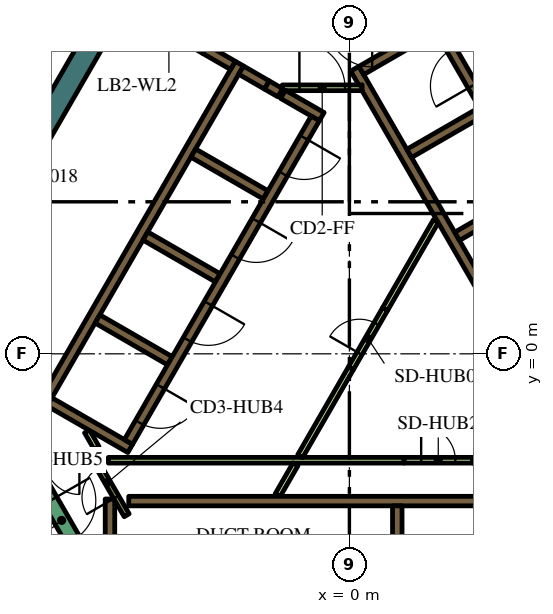
"""IFC4 building model, lengths in metres.
Left out: names, types, materials, properties, quantities, classifications, styles, units other than length and angle.
Written with IfcOpenShell. Run it as: python <this file> out.ifc"""

import sys

from ifc_helpers import new_model, si_unit, direction, frame, frame_2d, origin, place, context, subcontext, project, spatial, polyline, rectangle, outline, extrude, element, fill, save


model = new_model("IFC4")
c1 = context("Model", 3, precision=1e-05, world=origin(), true_north=direction((0.0, 1.0)))
c2 = subcontext(c1, "Body", "Model", "MODEL_VIEW")
j1 = project(units=[si_unit("LENGTHUNIT", "METRE"), si_unit("PLANEANGLEUNIT", "RADIAN")], contexts=[c1])
p1 = place(None, origin())
s1 = spatial("IfcSite", under=j1, at=p1, CompositionType="ELEMENT")
p2 = place(p1, origin())
s2 = spatial("IfcBuilding", under=s1, at=p2, CompositionType="ELEMENT")
p3 = place(p2, frame((0.0, 0.0, 288.0)))
s3 = spatial("IfcBuildingStorey", under=s2, at=p3, CompositionType="ELEMENT", Elevation=288.0)
p4 = place(p3, frame((1.989, 16.456, 0.0), z_axis=(0.0, 0.0, 1.0), x_axis=(0.49999102663, -0.8660305845, 0.0)))
e1 = element("IfcWall", 1, at=p4, inside=s3, PredefinedType="SOLIDWALL", context=c2, shape_type="SweptSolid", body=[
    extrude(rectangle(XDim=12.406, YDim=0.6, at=frame_2d((6.203, 0.0))), origin(), (0.0, 0.0, 1.0), 4.2),
])
p5 = place(p3, origin())
e2 = element("IfcWall", 2, at=p5, inside=s3, PredefinedType="SOLIDWALL", context=c2, shape_type="SweptSolid", body=[
    extrude(outline(polyline([(-15.502, -6.35), (-4.912, 11.992), (-4.393, 11.692), (-10.815, 0.569), (-10.84, 0.583), (-10.84, 0.583), (-10.84, 0.583), (-10.965, 0.367), (-10.965, 0.367), (-10.965, 0.367), (-10.94, 0.352), (-11.033, 0.191), (-14.809, -6.35), (-15.156, -6.95), (-15.502, -6.35)])), origin(), (0.0, 0.0, 1.0), 4.2),
])
p6 = place(p3, frame((-5.806, -3.875, 0.0), z_axis=(0.0, 0.0, 1.0), x_axis=(1.0, 0.0, 0.0)))
e3 = element("IfcWall", 3, at=p6, inside=s3, PredefinedType="SOLIDWALL", context=c2, shape_type="SweptSolid", body=[
    extrude(rectangle(XDim=12.231, YDim=0.25, at=frame_2d((6.116, 0.0))), origin(), (0.0, 0.0, 1.0), 4.2),
])
p7 = place(p3, frame((1.26, -4.0, 0.0), z_axis=(0.0, 0.0, 1.0), x_axis=(0.0, -1.0, 0.0)))
e4 = element("IfcWall", 4, at=p7, inside=s3, PredefinedType="SOLIDWALL", context=c2, shape_type="SweptSolid", body=[
    extrude(rectangle(XDim=2.2, YDim=0.25, at=frame_2d((1.1, 0.0))), origin(), (0.0, 0.0, 1.0), 4.2),
])
p8 = place(p3, frame((-6.3, -9.05, 0.0), z_axis=(0.0, 0.0, 1.0), x_axis=(0.0, 1.0, 0.0)))
e5 = element("IfcWall", 5, at=p8, inside=s3, PredefinedType="SOLIDWALL", context=c2, shape_type="SweptSolid", body=[
    extrude(rectangle(XDim=5.23, YDim=0.25, at=frame_2d((2.615, 0.0))), origin(), (0.0, 0.0, 1.0), 4.2),
])
e6 = element("IfcWall", 6, at=p5, inside=s3, PredefinedType="SOLIDWALL", context=c2, shape_type="SweptSolid", body=[
    extrude(outline(polyline([(0.332, 6.925), (0.335, 6.925), (0.335, 6.925), (0.335, 6.925), (0.335, 7.075), (0.335, 7.075), (0.335, 7.075), (0.245, 7.075), (0.035, 7.439), (0.252, 7.564), (0.377, 7.348), (1.512, 5.382), (1.637, 5.165), (2.221, 4.153), (2.771, 3.199), (2.896, 2.983), (3.138, 2.564), (4.031, 1.017), (4.156, 0.801), (5.292, -1.165), (5.417, -1.382), (6.073, -2.519), (6.552, -3.348), (6.677, -3.564), (6.46, -3.689), (0.332, 6.925)])), origin(), (0.0, 0.0, 1.0), 4.2),
])
p9 = place(p3, frame((3.1, 9.064, 0.0), z_axis=(0.0, 0.0, 1.0), x_axis=(-0.866030133475, -0.499991807846, 0.0)))
e7 = element("IfcWall", 7, at=p9, inside=s3, PredefinedType="SOLIDWALL", context=c2, shape_type="SweptSolid", body=[
    extrude(rectangle(XDim=3.217, YDim=0.25, at=frame_2d((1.608, 0.0))), origin(), (0.0, 0.0, 1.0), 4.2),
])
p10 = place(p3, frame((1.574, 5.274, 0.0), z_axis=(0.0, 0.0, 1.0), x_axis=(0.866028486751, 0.499994660107, 0.0)))
e8 = element("IfcWall", 8, at=p10, inside=s3, PredefinedType="SOLIDWALL", context=c2, shape_type="SweptSolid", body=[
    extrude(rectangle(XDim=2.2, YDim=0.25, at=frame_2d((1.1, 0.0))), origin(), (0.0, 0.0, 1.0), 4.2),
])
p11 = place(p3, frame((2.834, 3.091, 0.0), z_axis=(0.0, 0.0, 1.0), x_axis=(0.866008176907, 0.50002983664, 0.0)))
e9 = element("IfcWall", 9, at=p11, inside=s3, PredefinedType="SOLIDWALL", context=c2, shape_type="SweptSolid", body=[
    extrude(rectangle(XDim=2.2, YDim=0.25, at=frame_2d((1.1, 0.0))), origin(), (0.0, 0.0, 1.0), 4.2),
])
p12 = place(p3, frame((-8.06, -1.311, 0.0), z_axis=(0.0, 0.0, 1.0), x_axis=(0.50000273126, 0.866023826885, 0.0)))
e10 = element("IfcWall", 10, at=p12, inside=s3, PredefinedType="SOLIDWALL", context=c2, shape_type="SweptSolid", body=[
    extrude(rectangle(XDim=10.33, YDim=0.25, at=frame_2d((5.165, 0.0))), origin(), (0.0, 0.0, 1.0), 4.2),
])
p13 = place(p3, frame((-1.819, 6.87, 0.0), z_axis=(0.0, 0.0, 1.0), x_axis=(-0.866294599386, 0.499533449405, 0.0)))
e11 = element("IfcWall", 11, at=p13, inside=s3, PredefinedType="SOLIDWALL", context=c2, shape_type="SweptSolid", body=[
    extrude(rectangle(XDim=0.41, YDim=0.25, at=frame_2d((0.205, 0.0))), origin(), (0.0, 0.0, 1.0), 4.2),
])
p14 = place(p3, frame((-2.849, 7.465, 0.0), z_axis=(0.0, 0.0, 1.0), x_axis=(0.865955664968, -0.500120771724, 0.0)))
e12 = element("IfcWall", 12, at=p14, inside=s3, PredefinedType="SOLIDWALL", context=c2, shape_type="SweptSolid", body=[
    extrude(rectangle(XDim=0.778, YDim=0.25, at=frame_2d((0.389, 0.0))), origin(), (0.0, 0.0, 1.0), 4.2),
])
p15 = place(p3, frame((-0.728, 6.24, 0.0), z_axis=(0.0, 0.0, 1.0), x_axis=(-0.866002680491, 0.500039355833, 0.0)))
e13 = element("IfcWall", 13, at=p15, inside=s3, PredefinedType="SOLIDWALL", context=c2, shape_type="SweptSolid", body=[
    extrude(rectangle(XDim=1.178, YDim=0.25, at=frame_2d((0.589, 0.0))), origin(), (0.0, 0.0, 1.0), 4.2),
])
for number, where, z_axis, x_axis in (
    (14, (-2.204, 4.182, 0.0), (0.0, 0.0, 1.0), (-0.866, 0.5, 0.0)),
    (15, (-5.369, 3.1, 0.0), (0.0, 0.0, 1.0), (0.866, -0.5, 0.0)),
    (16, (-4.724, -0.182, 0.0), (0.0, 0.0, 1.0), (-0.866, 0.5, 0.0)),
):
    element("IfcWall", number, at=place(p3, frame(where, z_axis=z_axis, x_axis=x_axis)), inside=s3, PredefinedType="SOLIDWALL", context=c2, shape_type="SweptSolid", body=[
        extrude(rectangle(XDim=2.2, YDim=0.25, at=frame_2d((1.1, 0.0))), origin(), (0.0, 0.0, 1.0), 4.2),
    ])
p16 = place(p3, frame((-7.889, -1.265, 0.0), z_axis=(0.0, 0.0, 1.0), x_axis=(0.866057815567, -0.499943856944, 0.0)))
e17 = element("IfcWall", 17, at=p16, inside=s3, PredefinedType="SOLIDWALL", context=c2, shape_type="SweptSolid", body=[
    extrude(rectangle(XDim=2.45, YDim=0.25, at=frame_2d((1.225, 0.0))), origin(), (0.0, 0.0, 1.0), 4.2),
])
p17 = place(p3, frame((-3.809, 8.019, 0.0), z_axis=(0.0, 0.0, 1.0), x_axis=(0.866010229787, -0.500026281214, 0.0)))
e18 = element("IfcWall", 18, at=p17, inside=s3, PredefinedType="SOLIDWALL", context=c2, shape_type="SweptSolid", body=[
    extrude(rectangle(XDim=0.858, YDim=0.25, at=frame_2d((0.429, 0.0))), origin(), (0.0, 0.0, 1.0), 4.2),
])
p18 = place(p3, frame((0.941, 1.179, 0.0), z_axis=(0.0, 0.0, 1.0), x_axis=(0.499962406319, 0.866047107418, 0.0)))
e19 = element("IfcWall", 19, at=p18, inside=s3, PredefinedType="PARTITIONING", context=c2, shape_type="SweptSolid", body=[
    extrude(rectangle(XDim=2.672, YDim=0.15, at=frame_2d((1.336, 0.0))), origin(), (0.0, 0.0, 1.0), 3.55),
])
p19 = place(p3, frame((1.438, -2.8, 0.0), z_axis=(0.0, 0.0, 1.0), x_axis=(-1.0, 0.0, 0.0)))
e20 = element("IfcWall", 20, at=p19, inside=s3, PredefinedType="PARTITIONING", context=c2, shape_type="SweptSolid", body=[
    extrude(rectangle(XDim=7.781, YDim=0.15, at=frame_2d((3.891, 0.0))), origin(), (0.0, 0.0, 1.0), 3.55),
])
p20 = place(p3, frame((-1.418, -2.907, 0.0), z_axis=(0.0, 0.0, 1.0), x_axis=(-0.499978056798, -0.866038072327, 0.0)))
e21 = element("IfcWall", 21, at=p20, inside=s3, PredefinedType="PARTITIONING", context=c2, shape_type="SweptSolid", body=[
    extrude(rectangle(XDim=0.937, YDim=0.15, at=frame_2d((0.469, 0.0))), origin(), (0.0, 0.0, 1.0), 3.55),
])
for number, where, z_axis, x_axis in (
    (22, (-1.295, -2.693, 0.0), (0.0, 0.0, 1.0), (0.5, 0.866, 0.0)),
    (23, (3.238, -2.8, 0.0), (0.0, 0.0, 1.0), (1.0, 0.0, 0.0)),
):
    element("IfcWall", number, at=place(p3, frame(where, z_axis=z_axis, x_axis=x_axis)), inside=s3, PredefinedType="PARTITIONING", context=c2, shape_type="SweptSolid", body=[
        extrude(rectangle(XDim=2.672, YDim=0.15, at=frame_2d((1.336, 0.0))), origin(), (0.0, 0.0, 1.0), 3.55),
    ])
p21 = place(p3, frame((-6.653, -2.477, 0.0), z_axis=(0.0, 0.0, 1.0), x_axis=(-0.500002592159, 0.866023907196, 0.0)))
e24 = element("IfcWall", 24, at=p21, inside=s3, PredefinedType="PARTITIONING", context=c2, shape_type="SweptSolid", body=[
    extrude(rectangle(XDim=0.503, YDim=0.15, at=frame_2d((0.251, 0.0))), origin(), (0.0, 0.0, 1.0), 3.55),
])
p22 = place(p3, frame((8.565, -2.185, 0.0), z_axis=(0.0, 0.0, 1.0), x_axis=(-0.499997954832, 0.866026584559, 0.0)))
e25 = element("IfcWall", 25, at=p22, inside=s3, PredefinedType="SOLIDWALL", context=c2, shape_type="SweptSolid", body=[
    extrude(rectangle(XDim=12.35, YDim=0.25, at=frame_2d((6.175, 0.0))), origin(), (0.0, 0.0, 1.0), 4.2),
])
p23 = place(p22, frame((0.685, 0.0, 0.0)))
e26 = element("IfcOpeningElement", 26, at=p23, cuts=e25, PredefinedType="OPENING", context=c2, shape_type="SweptSolid", body=[
    extrude(rectangle(XDim=0.9, YDim=2.1, at=frame_2d((0.45, 1.05))), frame((0.0, 0.135, 0.0), z_axis=(0.0, -1.0, 0.0), x_axis=(1.0, 0.0, 0.0)), (0.0, 0.0, 1.0), 0.27),
])
p24 = place(p22, frame((3.105, 0.0, 0.0)))
e27 = element("IfcOpeningElement", 27, at=p24, cuts=e25, PredefinedType="OPENING", context=c2, shape_type="SweptSolid", body=[
    extrude(rectangle(XDim=1.1, YDim=2.1, at=frame_2d((0.55, 1.05))), frame((0.0, 0.135, 0.0), z_axis=(0.0, -1.0, 0.0), x_axis=(1.0, 0.0, 0.0)), (0.0, 0.0, 1.0), 0.27),
])
p25 = place(p22, frame((5.625, 0.0, 0.0)))
e28 = element("IfcOpeningElement", 28, at=p25, cuts=e25, PredefinedType="OPENING", context=c2, shape_type="SweptSolid", body=[
    extrude(rectangle(XDim=1.1, YDim=2.1, at=frame_2d((0.55, 1.05))), frame((0.0, 0.135, 0.0), z_axis=(0.0, -1.0, 0.0), x_axis=(1.0, 0.0, 0.0)), (0.0, 0.0, 1.0), 0.27),
])
p26 = place(p22, frame((8.145, 0.0, 0.0)))
e29 = element("IfcOpeningElement", 29, at=p26, cuts=e25, PredefinedType="OPENING", context=c2, shape_type="SweptSolid", body=[
    extrude(rectangle(XDim=1.1, YDim=2.1, at=frame_2d((0.55, 1.05))), frame((0.0, 0.135, 0.0), z_axis=(0.0, -1.0, 0.0), x_axis=(1.0, 0.0, 0.0)), (0.0, 0.0, 1.0), 0.27),
])
p27 = place(p22, frame((10.665, 0.0, 0.0)))
e30 = element("IfcOpeningElement", 30, at=p27, cuts=e25, PredefinedType="OPENING", context=c2, shape_type="SweptSolid", body=[
    extrude(rectangle(XDim=1.1, YDim=2.1, at=frame_2d((0.55, 1.05))), frame((0.0, 0.135, 0.0), z_axis=(0.0, -1.0, 0.0), x_axis=(1.0, 0.0, 0.0)), (0.0, 0.0, 1.0), 0.27),
])
p28 = place(p3, frame((-0.898, 6.194, 0.0), z_axis=(0.0, 0.0, 1.0), x_axis=(-0.499996202215, -0.866027596426, 0.0)))
e31 = element("IfcWall", 31, at=p28, inside=s3, PredefinedType="SOLIDWALL", context=c2, shape_type="SweptSolid", body=[
    extrude(rectangle(XDim=9.83, YDim=0.25, at=frame_2d((4.915, 0.0))), origin(), (0.0, 0.0, 1.0), 4.2),
])
p29 = place(p28, frame((0.585, 0.0, 0.0)))
e32 = element("IfcOpeningElement", 32, at=p29, cuts=e31, PredefinedType="OPENING", context=c2, shape_type="SweptSolid", body=[
    extrude(rectangle(XDim=1.1, YDim=2.1, at=frame_2d((0.55, 1.05))), frame((0.0, 0.135, 0.0), z_axis=(0.0, -1.0, 0.0), x_axis=(1.0, 0.0, 0.0)), (0.0, 0.0, 1.0), 0.27),
])
p30 = place(p28, frame((3.105, 0.0, 0.0)))
e33 = element("IfcOpeningElement", 33, at=p30, cuts=e31, PredefinedType="OPENING", context=c2, shape_type="SweptSolid", body=[
    extrude(rectangle(XDim=1.1, YDim=2.1, at=frame_2d((0.55, 1.05))), frame((0.0, 0.135, 0.0), z_axis=(0.0, -1.0, 0.0), x_axis=(1.0, 0.0, 0.0)), (0.0, 0.0, 1.0), 0.27),
])
p31 = place(p28, frame((5.625, 0.0, 0.0)))
e34 = element("IfcOpeningElement", 34, at=p31, cuts=e31, PredefinedType="OPENING", context=c2, shape_type="SweptSolid", body=[
    extrude(rectangle(XDim=1.1, YDim=2.1, at=frame_2d((0.55, 1.05))), frame((0.0, 0.135, 0.0), z_axis=(0.0, -1.0, 0.0), x_axis=(1.0, 0.0, 0.0)), (0.0, 0.0, 1.0), 0.27),
])
p32 = place(p28, frame((8.145, 0.0, 0.0)))
e35 = element("IfcOpeningElement", 35, at=p32, cuts=e31, PredefinedType="OPENING", context=c2, shape_type="SweptSolid", body=[
    extrude(rectangle(XDim=1.1, YDim=2.1, at=frame_2d((0.55, 1.05))), frame((0.0, 0.135, 0.0), z_axis=(0.0, -1.0, 0.0), x_axis=(1.0, 0.0, 0.0)), (0.0, 0.0, 1.0), 0.27),
])
p33 = place(p3, frame((-8.098, -3.474, 0.0), z_axis=(0.0, 0.0, 1.0), x_axis=(0.49994051562, -0.866059744384, 0.0)))
e36 = element("IfcWall", 36, at=p33, inside=s3, PredefinedType="SOLIDWALL", context=c2, shape_type="SweptSolid", body=[
    extrude(rectangle(XDim=2.1, YDim=0.4, at=frame_2d((1.05, 0.0))), origin(), (0.0, 0.0, 1.0), 4.2),
])
p34 = place(p33, frame((0.45, 0.0, 0.0)))
e37 = element("IfcOpeningElement", 37, at=p34, cuts=e36, PredefinedType="OPENING", context=c2, shape_type="SweptSolid", body=[
    extrude(rectangle(XDim=1.2, YDim=2.1, at=frame_2d((0.6, 1.05))), frame((0.0, 0.21, 0.0), z_axis=(0.0, -1.0, 0.0), x_axis=(1.0, 0.0, 0.0)), (0.0, 0.0, 1.0), 0.42),
])
p35 = place(p3, frame((-1.765, 7.0, 0.0), z_axis=(0.0, 0.0, 1.0), x_axis=(1.0, 0.0, 0.0)))
e38 = element("IfcWall", 38, at=p35, inside=s3, PredefinedType="PARTITIONING", context=c2, shape_type="SweptSolid", body=[
    extrude(rectangle(XDim=2.1, YDim=0.15, at=frame_2d((1.05, 0.0))), origin(), (0.0, 0.0, 1.0), 3.55),
])
p36 = place(p35, frame((0.45, 0.0, 0.0)))
e39 = element("IfcOpeningElement", 39, at=p36, cuts=e38, PredefinedType="OPENING", context=c2, shape_type="SweptSolid", body=[
    extrude(rectangle(XDim=1.2, YDim=2.1, at=frame_2d((0.6, 1.05))), frame((0.0, 0.085, 0.0), z_axis=(0.0, -1.0, 0.0), x_axis=(1.0, 0.0, 0.0)), (0.0, 0.0, 1.0), 0.17),
])
p37 = place(p3, frame((-5.861, -4.248, 0.0), z_axis=(0.0, 0.0, 1.0), x_axis=(-0.500043646338, 0.866000203093, 0.0)))
e40 = element("IfcWall", 40, at=p37, inside=s3, PredefinedType="PARTITIONING", context=c2, shape_type="SweptSolid", body=[
    extrude(rectangle(XDim=1.93, YDim=0.15, at=frame_2d((0.965, 0.0))), origin(), (0.0, 0.0, 1.0), 4.2),
])
p38 = place(p37, frame((0.55, 0.0, 0.0)))
e41 = element("IfcOpeningElement", 41, at=p38, cuts=e40, PredefinedType="OPENING", context=c2, shape_type="SweptSolid", body=[
    extrude(rectangle(XDim=0.9, YDim=2.1, at=frame_2d((0.45, 1.05))), frame((0.0, 0.085, 0.0), z_axis=(0.0, -1.0, 0.0), x_axis=(1.0, 0.0, 0.0)), (0.0, 0.0, 1.0), 0.17),
])
p39 = place(p3, frame((-5.659, 9.012, 0.0), z_axis=(0.0, 0.0, 1.0), x_axis=(0.866009402589, -0.500027713859, 0.0)))
e42 = element("IfcWall", 42, at=p39, inside=s3, PredefinedType="PARTITIONING", context=c2, shape_type="SweptSolid", body=[
    extrude(rectangle(XDim=2.1, YDim=0.12, at=frame_2d((1.05, 0.0))), origin(), (0.0, 0.0, 1.0), 3.55),
])
p40 = place(p39, frame((0.45, 0.0, 0.0)))
e43 = element("IfcOpeningElement", 43, at=p40, cuts=e42, PredefinedType="OPENING", context=c2, shape_type="SweptSolid", body=[
    extrude(rectangle(XDim=1.2, YDim=2.1, at=frame_2d((0.6, 1.05))), frame((0.0, 0.07, 0.0), z_axis=(0.0, -1.0, 0.0), x_axis=(1.0, 0.0, 0.0)), (0.0, 0.0, 1.0), 0.14),
])
p41 = place(p3, frame((0.041, -0.379, 0.0), z_axis=(0.0, 0.0, 1.0), x_axis=(0.499961193289, 0.866047807691, 0.0)))
e44 = element("IfcWall", 44, at=p41, inside=s3, PredefinedType="PARTITIONING", context=c2, shape_type="SweptSolid", body=[
    extrude(rectangle(XDim=1.8, YDim=0.15, at=frame_2d((0.9, 0.0))), origin(), (0.0, 0.0, 1.0), 3.55),
])
p42 = place(p41, frame((0.45, 0.0, 0.0)))
e45 = element("IfcOpeningElement", 45, at=p42, cuts=e44, PredefinedType="OPENING", context=c2, shape_type="SweptSolid", body=[
    extrude(rectangle(XDim=0.9, YDim=2.1, at=frame_2d((0.45, 1.05))), frame((0.0, 0.085, 0.0), z_axis=(0.0, -1.0, 0.0), x_axis=(1.0, 0.0, 0.0)), (0.0, 0.0, 1.0), 0.17),
])
p43 = place(p3, frame((1.438, -2.8, 0.0), z_axis=(0.0, 0.0, 1.0), x_axis=(1.0, 0.0, 0.0)))
e46 = element("IfcWall", 46, at=p43, inside=s3, PredefinedType="PARTITIONING", context=c2, shape_type="SweptSolid", body=[
    extrude(rectangle(XDim=1.8, YDim=0.15, at=frame_2d((0.9, 0.0))), origin(), (0.0, 0.0, 1.0), 3.55),
])
p44 = place(p43, frame((0.45, 0.0, 0.0)))
e47 = element("IfcOpeningElement", 47, at=p44, cuts=e46, PredefinedType="OPENING", context=c2, shape_type="SweptSolid", body=[
    extrude(rectangle(XDim=0.9, YDim=2.1, at=frame_2d((0.45, 1.05))), frame((0.0, 0.085, 0.0), z_axis=(0.0, -1.0, 0.0), x_axis=(1.0, 0.0, 0.0)), (0.0, 0.0, 1.0), 0.17),
])
p45 = place(p3, frame((-6.655, -2.8, 0.0), z_axis=(0.0, 0.0, 1.0), x_axis=(-1.0, 0.0, 0.0)))
e48 = element("IfcWall", 48, at=p45, inside=s3, PredefinedType="PARTITIONING", context=c2, shape_type="SweptSolid", body=[
    extrude(rectangle(XDim=1.8, YDim=0.15, at=frame_2d((0.9, 0.0))), origin(), (0.0, 0.0, 1.0), 3.55),
])
p46 = place(p45, frame((0.45, 0.0, 0.0)))
e49 = element("IfcOpeningElement", 49, at=p46, cuts=e48, PredefinedType="OPENING", context=c2, shape_type="SweptSolid", body=[
    extrude(rectangle(XDim=0.9, YDim=2.1, at=frame_2d((0.45, 1.05))), frame((0.0, 0.085, 0.0), z_axis=(0.0, -1.0, 0.0), x_axis=(1.0, 0.0, 0.0)), (0.0, 0.0, 1.0), 0.17),
])
p47 = place(p3, frame((-7.436, 11.221, 0.0), z_axis=(0.0, 0.0, 1.0), x_axis=(-0.49999894854, -0.866026010844, 0.0)))
e50 = element("IfcWall", 50, at=p47, inside=s3, PredefinedType="PARTITIONING", context=c2, shape_type="SweptSolid", body=[
    extrude(rectangle(XDim=12.0, YDim=0.2, at=frame_2d((6.0, 0.0))), origin(), (0.0, 0.0, 1.0), 3.55),
])
p48 = place(p47, frame((5.5, 0.0, 0.0)))
e51 = element("IfcOpeningElement", 51, at=p48, cuts=e50, PredefinedType="OPENING", context=c2, shape_type="SweptSolid", body=[
    extrude(rectangle(XDim=1.0, YDim=2.1, at=frame_2d((0.5, 1.05))), frame((0.0, 0.11, 0.0), z_axis=(0.0, -1.0, 0.0), x_axis=(1.0, 0.0, 0.0)), (0.0, 0.0, 1.0), 0.22),
])
p49 = place(p27, origin())
e52 = element("IfcDoor", 52, at=p49, inside=s3, OperationType="DOUBLE_DOOR_SLIDING", PredefinedType="DOOR", context=c2, shape_type="SweptSolid", body=[
    extrude(rectangle(XDim=1.1, YDim=2.1, at=frame_2d((0.55, 1.05))), frame((0.0, 0.025, 0.0), z_axis=(0.0, -1.0, 0.0), x_axis=(1.0, 0.0, 0.0)), (0.0, 0.0, 1.0), 0.05),
])
fill(e30, e52)
p50 = place(p29, origin())
e53 = element("IfcDoor", 53, at=p50, inside=s3, OperationType="DOUBLE_DOOR_SLIDING", PredefinedType="DOOR", context=c2, shape_type="SweptSolid", body=[
    extrude(rectangle(XDim=1.1, YDim=2.1, at=frame_2d((0.55, 1.05))), frame((0.0, 0.025, 0.0), z_axis=(0.0, -1.0, 0.0), x_axis=(1.0, 0.0, 0.0)), (0.0, 0.0, 1.0), 0.05),
])
fill(e32, e53)
p51 = place(p30, origin())
e54 = element("IfcDoor", 54, at=p51, inside=s3, OperationType="DOUBLE_DOOR_SLIDING", PredefinedType="DOOR", context=c2, shape_type="SweptSolid", body=[
    extrude(rectangle(XDim=1.1, YDim=2.1, at=frame_2d((0.55, 1.05))), frame((0.0, 0.025, 0.0), z_axis=(0.0, -1.0, 0.0), x_axis=(1.0, 0.0, 0.0)), (0.0, 0.0, 1.0), 0.05),
])
fill(e33, e54)
p52 = place(p31, origin())
e55 = element("IfcDoor", 55, at=p52, inside=s3, OperationType="DOUBLE_DOOR_SLIDING", PredefinedType="DOOR", context=c2, shape_type="SweptSolid", body=[
    extrude(rectangle(XDim=1.1, YDim=2.1, at=frame_2d((0.55, 1.05))), frame((0.0, 0.025, 0.0), z_axis=(0.0, -1.0, 0.0), x_axis=(1.0, 0.0, 0.0)), (0.0, 0.0, 1.0), 0.05),
])
fill(e34, e55)
p53 = place(p32, origin())
e56 = element("IfcDoor", 56, at=p53, inside=s3, OperationType="DOUBLE_DOOR_SLIDING", PredefinedType="DOOR", context=c2, shape_type="SweptSolid", body=[
    extrude(rectangle(XDim=1.1, YDim=2.1, at=frame_2d((0.55, 1.05))), frame((0.0, 0.025, 0.0), z_axis=(0.0, -1.0, 0.0), x_axis=(1.0, 0.0, 0.0)), (0.0, 0.0, 1.0), 0.05),
])
fill(e35, e56)
p54 = place(p34, origin())
e57 = element("IfcDoor", 57, at=p54, inside=s3, OperationType="SINGLE_SWING_LEFT", PredefinedType="DOOR", context=c2, shape_type="SweptSolid", body=[
    extrude(rectangle(XDim=1.2, YDim=2.1, at=frame_2d((0.6, 1.05))), frame((0.0, 0.025, 0.0), z_axis=(0.0, -1.0, 0.0), x_axis=(1.0, 0.0, 0.0)), (0.0, 0.0, 1.0), 0.05),
])
fill(e37, e57)
p55 = place(p36, origin())
e58 = element("IfcDoor", 58, at=p55, inside=s3, OperationType="SINGLE_SWING_LEFT", PredefinedType="DOOR", context=c2, shape_type="SweptSolid", body=[
    extrude(rectangle(XDim=1.2, YDim=2.1, at=frame_2d((0.6, 1.05))), frame((0.0, 0.025, 0.0), z_axis=(0.0, -1.0, 0.0), x_axis=(1.0, 0.0, 0.0)), (0.0, 0.0, 1.0), 0.05),
])
fill(e39, e58)
p56 = place(p38, origin())
e59 = element("IfcDoor", 59, at=p56, inside=s3, OperationType="SINGLE_SWING_LEFT", PredefinedType="DOOR", context=c2, shape_type="SweptSolid", body=[
    extrude(rectangle(XDim=0.9, YDim=2.1, at=frame_2d((0.45, 1.05))), frame((0.0, 0.025, 0.0), z_axis=(0.0, -1.0, 0.0), x_axis=(1.0, 0.0, 0.0)), (0.0, 0.0, 1.0), 0.05),
])
fill(e41, e59)
p57 = place(p42, origin())
e60 = element("IfcDoor", 60, at=p57, inside=s3, OperationType="SINGLE_SWING_LEFT", PredefinedType="DOOR", context=c2, shape_type="SweptSolid", body=[
    extrude(rectangle(XDim=0.9, YDim=2.1, at=frame_2d((0.45, 1.05))), frame((0.0, 0.025, 0.0), z_axis=(0.0, -1.0, 0.0), x_axis=(1.0, 0.0, 0.0)), (0.0, 0.0, 1.0), 0.05),
])
fill(e45, e60)
p58 = place(p44, origin())
e61 = element("IfcDoor", 61, at=p58, inside=s3, OperationType="SINGLE_SWING_LEFT", PredefinedType="DOOR", context=c2, shape_type="SweptSolid", body=[
    extrude(rectangle(XDim=0.9, YDim=2.1, at=frame_2d((0.45, 1.05))), frame((0.0, 0.025, 0.0), z_axis=(0.0, -1.0, 0.0), x_axis=(1.0, 0.0, 0.0)), (0.0, 0.0, 1.0), 0.05),
])
fill(e47, e61)
p59 = place(p46, origin())
e62 = element("IfcDoor", 62, at=p59, inside=s3, OperationType="SINGLE_SWING_LEFT", PredefinedType="DOOR", context=c2, shape_type="SweptSolid", body=[
    extrude(rectangle(XDim=0.9, YDim=2.1, at=frame_2d((0.45, 1.05))), frame((0.0, 0.025, 0.0), z_axis=(0.0, -1.0, 0.0), x_axis=(1.0, 0.0, 0.0)), (0.0, 0.0, 1.0), 0.05),
])
fill(e49, e62)
save(model, sys.argv[1])
